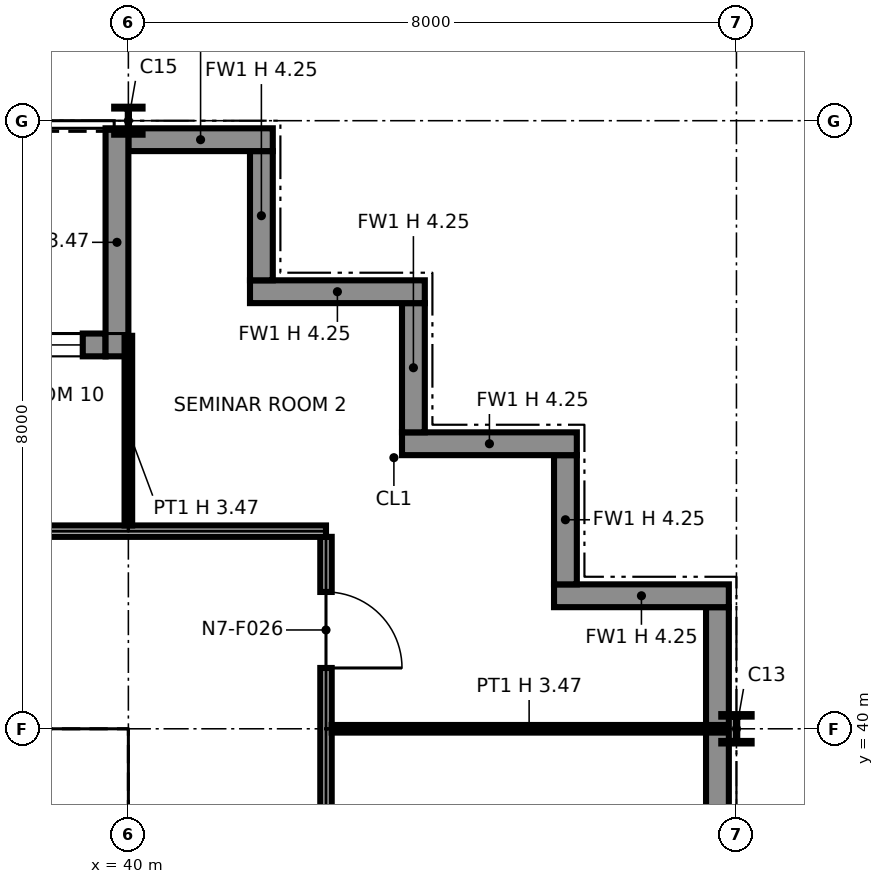
"""IFC4 building model, lengths in metres.
Left out: names, types, materials, properties, quantities, classifications, styles, units other than length and angle.
Written with IfcOpenShell. Run it as: python <this file> out.ifc"""

import sys

from ifc_helpers import new_model, si_unit, direction, frame, frame_2d, origin, origin_2d, place, context, subcontext, project, spatial, polyline, rectangle, i_section, outline, extrude, element, fill, save


model = new_model("IFC4")
c1 = context("Model", 3, precision=1e-05, world=origin(), true_north=direction((0.0, 1.0)))
c2 = subcontext(c1, "Body", "Model", "MODEL_VIEW")
j1 = project(units=[si_unit("LENGTHUNIT", "METRE"), si_unit("PLANEANGLEUNIT", "RADIAN")], contexts=[c1])
p1 = place(None, origin())
s1 = spatial("IfcSite", under=j1, at=p1, CompositionType="ELEMENT")
p2 = place(p1, origin())
s2 = spatial("IfcBuilding", under=s1, at=p2, CompositionType="ELEMENT")
p3 = place(p2, frame((0.0, 0.0, 105.2)))
s3 = spatial("IfcBuildingStorey", under=s2, at=p3, CompositionType="ELEMENT", Elevation=105.2)
p4 = place(p3, frame((40.0, 40.0, 0.0), z_axis=(0.0, 0.0, 1.0), x_axis=(1.0, 0.0, 0.0)))
e1 = element("IfcColumn", 1, at=p4, inside=s3, PredefinedType="COLUMN", context=c2, shape_type="SweptSolid", body=[
    extrude(i_section(OverallWidth=0.257, OverallDepth=0.363, WebThickness=0.013, FlangeThickness=0.022, at=origin_2d()), origin(), (0.0, 0.0, 1.0), 4.25),
])
p5 = place(p3, frame((40.0, 48.0, 0.0), z_axis=(0.0, 0.0, 1.0), x_axis=(1.0, 0.0, 0.0)))
e2 = element("IfcColumn", 2, at=p5, inside=s3, PredefinedType="COLUMN", context=c2, shape_type="SweptSolid", body=[
    extrude(i_section(OverallWidth=0.373, OverallDepth=0.368, WebThickness=0.015, FlangeThickness=0.024, at=origin_2d()), origin(), (0.0, 0.0, 1.0), 4.25),
])
p6 = place(p3, frame((48.0, 40.0, 0.0), z_axis=(0.0, 0.0, 1.0), x_axis=(1.0, 0.0, 0.0)))
e3 = element("IfcColumn", 3, at=p6, inside=s3, PredefinedType="COLUMN", context=c2, shape_type="SweptSolid", body=[
    extrude(i_section(OverallWidth=0.399, OverallDepth=0.386, WebThickness=0.021, FlangeThickness=0.033, at=origin_2d()), origin(), (0.0, 0.0, 1.0), 4.25),
])
p7 = place(p3, frame((47.75, 32.0, 0.0), z_axis=(0.0, 0.0, 1.0), x_axis=(0.0, 1.0, 0.0)))
e4 = element("IfcWall", 4, at=p7, inside=s3, PredefinedType="SOLIDWALL", context=c2, shape_type="SweptSolid", body=[
    extrude(rectangle(XDim=9.6, YDim=0.3, at=frame_2d((4.8, 0.0))), origin(), (0.0, 0.0, 1.0), 4.25),
])
p8 = place(p3, frame((47.9, 41.75, 0.0), z_axis=(0.0, 0.0, 1.0), x_axis=(-1.0, 0.0, 0.0)))
e5 = element("IfcWall", 5, at=p8, inside=s3, PredefinedType="SOLIDWALL", context=c2, shape_type="SweptSolid", body=[
    extrude(rectangle(XDim=2.3, YDim=0.3, at=frame_2d((1.15, 0.0))), origin(), (0.0, 0.0, 1.0), 4.25),
])
p9 = place(p3, frame((45.75, 41.9, 0.0), z_axis=(0.0, 0.0, 1.0), x_axis=(0.0, 1.0, 0.0)))
e6 = element("IfcWall", 6, at=p9, inside=s3, PredefinedType="SOLIDWALL", context=c2, shape_type="SweptSolid", body=[
    extrude(rectangle(XDim=1.7, YDim=0.3, at=frame_2d((0.85, 0.0))), origin(), (0.0, 0.0, 1.0), 4.25),
])
p10 = place(p3, frame((45.9, 43.75, 0.0), z_axis=(0.0, 0.0, 1.0), x_axis=(-1.0, 0.0, 0.0)))
e7 = element("IfcWall", 7, at=p10, inside=s3, PredefinedType="SOLIDWALL", context=c2, shape_type="SweptSolid", body=[
    extrude(rectangle(XDim=2.3, YDim=0.3, at=frame_2d((1.15, 0.0))), origin(), (0.0, 0.0, 1.0), 4.25),
])
p11 = place(p3, frame((43.75, 43.9, 0.0), z_axis=(0.0, 0.0, 1.0), x_axis=(0.0, 1.0, 0.0)))
e8 = element("IfcWall", 8, at=p11, inside=s3, PredefinedType="SOLIDWALL", context=c2, shape_type="SweptSolid", body=[
    extrude(rectangle(XDim=1.7, YDim=0.3, at=frame_2d((0.85, 0.0))), origin(), (0.0, 0.0, 1.0), 4.25),
])
p12 = place(p3, frame((43.9, 45.75, 0.0), z_axis=(0.0, 0.0, 1.0), x_axis=(-1.0, 0.0, 0.0)))
e9 = element("IfcWall", 9, at=p12, inside=s3, PredefinedType="SOLIDWALL", context=c2, shape_type="SweptSolid", body=[
    extrude(rectangle(XDim=2.3, YDim=0.3, at=frame_2d((1.15, 0.0))), origin(), (0.0, 0.0, 1.0), 4.25),
])
p13 = place(p3, frame((41.75, 45.9, 0.0), z_axis=(0.0, 0.0, 1.0), x_axis=(0.0, 1.0, 0.0)))
e10 = element("IfcWall", 10, at=p13, inside=s3, PredefinedType="SOLIDWALL", context=c2, shape_type="SweptSolid", body=[
    extrude(rectangle(XDim=1.7, YDim=0.3, at=frame_2d((0.85, 0.0))), origin(), (0.0, 0.0, 1.0), 4.25),
])
p14 = place(p3, frame((41.9, 47.75, 0.0), z_axis=(0.0, 0.0, 1.0), x_axis=(-1.0, 0.0, 0.0)))
e11 = element("IfcWall", 11, at=p14, inside=s3, PredefinedType="SOLIDWALL", context=c2, shape_type="SweptSolid", body=[
    extrude(rectangle(XDim=1.9, YDim=0.3, at=frame_2d((0.95, 0.0))), origin(), (0.0, 0.0, 1.0), 4.25),
])
p15 = place(p3, frame((39.7, 45.05, 0.0), z_axis=(0.0, 0.0, 1.0), x_axis=(-1.0, 0.0, 0.0)))
e12 = element("IfcWall", 12, at=p15, inside=s3, PredefinedType="SOLIDWALL", context=c2, shape_type="SweptSolid", body=[
    extrude(rectangle(XDim=7.4, YDim=0.3, at=frame_2d((3.7, 0.0))), origin(), (0.0, 0.0, 1.0), 4.25),
])
p16 = place(p15, frame((0.3, 0.0, 0.9)))
e13 = element("IfcOpeningElement", 13, at=p16, cuts=e12, PredefinedType="OPENING", context=c2, shape_type="SweptSolid", body=[
    extrude(rectangle(XDim=2.8, YDim=2.2, at=frame_2d((1.4, 1.1))), frame((0.0, 0.16, 0.0), z_axis=(0.0, -1.0, 0.0), x_axis=(1.0, 0.0, 0.0)), (0.0, 0.0, 1.0), 0.32),
])
p17 = place(p15, frame((4.7, 0.0, 0.0)))
e14 = element("IfcOpeningElement", 14, at=p17, cuts=e12, PredefinedType="OPENING", context=c2, shape_type="SweptSolid", body=[
    extrude(rectangle(XDim=2.0, YDim=2.4, at=frame_2d((1.0, 1.2))), frame((0.0, 0.16, 0.0), z_axis=(0.0, -1.0, 0.0), x_axis=(1.0, 0.0, 0.0)), (0.0, 0.0, 1.0), 0.32),
])
p18 = place(p3, frame((39.85, 47.9, 0.0), z_axis=(0.0, 0.0, 1.0), x_axis=(0.0, -1.0, 0.0)))
e15 = element("IfcWall", 15, at=p18, inside=s3, PredefinedType="SOLIDWALL", context=c2, shape_type="SweptSolid", body=[
    extrude(rectangle(XDim=3.0, YDim=0.3, at=frame_2d((1.5, 0.0))), origin(), (0.0, 0.0, 1.0), 3.469),
])
p19 = place(p3, frame((24.65, 39.25, 0.0), z_axis=(0.0, 0.0, 1.0), x_axis=(1.0, 0.0, 0.0)))
e16 = element("IfcWall", 16, at=p19, inside=s3, PredefinedType="PARTITIONING", context=c2, shape_type="SweptSolid", body=[
    extrude(outline(polyline([(0.0, 0.0), (14.7, 0.0), (14.7, 4.25), (7.469, 4.25), (7.469, 3.632), (7.231, 3.632), (7.23, 4.25), (0.0, 4.25), (0.0, 0.0)])), frame((0.0, 0.1, 0.0), z_axis=(0.0, -1.0, 0.0), x_axis=(1.0, 0.0, 0.0)), (0.0, 0.0, 1.0), 0.2),
])
p20 = place(p3, frame((39.25, 32.85, 0.0), z_axis=(0.0, 0.0, 1.0), x_axis=(0.0, 1.0, 0.0)))
e17 = element("IfcWall", 17, at=p20, inside=s3, PredefinedType="PARTITIONING", context=c2, shape_type="SweptSolid", body=[
    extrude(rectangle(XDim=6.3, YDim=0.2, at=frame_2d((3.15, 0.0))), origin(), (0.0, 0.0, 1.0), 4.25),
])
p21 = place(p3, frame((42.6, 16.0, 0.0), z_axis=(0.0, 0.0, 1.0), x_axis=(0.0, 1.0, 0.0)))
e18 = element("IfcWall", 18, at=p21, inside=s3, PredefinedType="PARTITIONING", context=c2, shape_type="SweptSolid", body=[
    extrude(outline(polyline([(0.0, 0.0), (26.525, 0.0), (26.525, 4.25), (24.3, 4.25), (24.298, 3.47), (23.702, 3.47), (23.7, 4.25), (20.3, 4.25), (20.298, 3.47), (19.702, 3.47), (19.7, 4.25), (16.3, 4.25), (16.298, 3.47), (15.702, 3.47), (15.7, 4.25), (12.3, 4.25), (12.298, 3.47), (11.702, 3.47), (11.7, 4.25), (8.3, 4.25), (8.298, 3.47), (7.702, 3.47), (7.7, 4.25), (4.3, 4.25), (4.298, 3.47), (3.702, 3.47), (3.7, 4.25), (0.0, 4.25), (0.0, 0.0)])), frame((0.0, 0.075, 0.0), z_axis=(0.0, -1.0, 0.0), x_axis=(1.0, 0.0, 0.0)), (0.0, 0.0, 1.0), 0.15),
])
p22 = place(p21, frame((2.5, 0.0, 0.0), z_axis=(0.0, 0.0, 1.0), x_axis=(-1.0, 0.0, 0.0)))
e19 = element("IfcOpeningElement", 19, at=p22, cuts=e18, PredefinedType="OPENING", context=c2, shape_type="SweptSolid", body=[
    extrude(rectangle(XDim=1.0, YDim=2.1, at=frame_2d((0.5, 1.05))), frame((0.0, 0.085, 0.0), z_axis=(0.0, -1.0, 0.0), x_axis=(1.0, 0.0, 0.0)), (0.0, 0.0, 1.0), 0.17),
])
p23 = place(p21, frame((6.5, 0.0, 0.0), z_axis=(0.0, 0.0, 1.0), x_axis=(-1.0, 0.0, 0.0)))
e20 = element("IfcOpeningElement", 20, at=p23, cuts=e18, PredefinedType="OPENING", context=c2, shape_type="SweptSolid", body=[
    extrude(rectangle(XDim=1.0, YDim=2.1, at=frame_2d((0.5, 1.05))), frame((0.0, 0.085, 0.0), z_axis=(0.0, -1.0, 0.0), x_axis=(1.0, 0.0, 0.0)), (0.0, 0.0, 1.0), 0.17),
])
p24 = place(p21, frame((12.5, 0.0, 0.0), z_axis=(0.0, 0.0, 1.0), x_axis=(-1.0, 0.0, 0.0)))
e21 = element("IfcOpeningElement", 21, at=p24, cuts=e18, PredefinedType="OPENING", context=c2, shape_type="SweptSolid", body=[
    extrude(rectangle(XDim=1.0, YDim=2.1, at=frame_2d((0.5, 1.05))), frame((0.0, 0.085, 0.0), z_axis=(0.0, -1.0, 0.0), x_axis=(1.0, 0.0, 0.0)), (0.0, 0.0, 1.0), 0.17),
])
p25 = place(p21, frame((18.5, 0.0, 0.0), z_axis=(0.0, 0.0, 1.0), x_axis=(-1.0, 0.0, 0.0)))
e22 = element("IfcOpeningElement", 22, at=p25, cuts=e18, PredefinedType="OPENING", context=c2, shape_type="SweptSolid", body=[
    extrude(rectangle(XDim=1.0, YDim=2.1, at=frame_2d((0.5, 1.05))), frame((0.0, 0.085, 0.0), z_axis=(0.0, -1.0, 0.0), x_axis=(1.0, 0.0, 0.0)), (0.0, 0.0, 1.0), 0.17),
])
p26 = place(p21, frame((22.5, 0.0, 0.0), z_axis=(0.0, 0.0, 1.0), x_axis=(-1.0, 0.0, 0.0)))
e23 = element("IfcOpeningElement", 23, at=p26, cuts=e18, PredefinedType="OPENING", context=c2, shape_type="SweptSolid", body=[
    extrude(rectangle(XDim=1.0, YDim=2.1, at=frame_2d((0.5, 1.05))), frame((0.0, 0.085, 0.0), z_axis=(0.0, -1.0, 0.0), x_axis=(1.0, 0.0, 0.0)), (0.0, 0.0, 1.0), 0.17),
])
p27 = place(p21, frame((25.8, 0.0, 0.0), z_axis=(0.0, 0.0, 1.0), x_axis=(-1.0, 0.0, 0.0)))
e24 = element("IfcOpeningElement", 24, at=p27, cuts=e18, PredefinedType="OPENING", context=c2, shape_type="SweptSolid", body=[
    extrude(rectangle(XDim=1.0, YDim=2.1, at=frame_2d((0.5, 1.05))), frame((0.0, 0.085, 0.0), z_axis=(0.0, -1.0, 0.0), x_axis=(1.0, 0.0, 0.0)), (0.0, 0.0, 1.0), 0.17),
])
p28 = place(p3, frame((42.675, 40.0, 0.0), z_axis=(0.0, 0.0, 1.0), x_axis=(1.0, 0.0, 0.0)))
e25 = element("IfcWall", 25, at=p28, inside=s3, PredefinedType="PARTITIONING", context=c2, shape_type="SweptSolid", body=[
    extrude(rectangle(XDim=5.195, YDim=0.1, at=frame_2d((2.598, 0.0))), origin(), (0.0, 0.0, 1.0), 3.47),
])
p29 = place(p3, frame((8.05, 42.6, 0.0), z_axis=(0.0, 0.0, 1.0), x_axis=(1.0, 0.0, 0.0)))
e26 = element("IfcWall", 26, at=p29, inside=s3, PredefinedType="PARTITIONING", context=c2, shape_type="SweptSolid", body=[
    extrude(rectangle(XDim=34.55, YDim=0.15, at=frame_2d((17.275, 0.0))), origin(), (0.0, 0.0, 1.0), 4.25),
])
p30 = place(p29, frame((9.45, 0.0, 0.0)))
e27 = element("IfcOpeningElement", 27, at=p30, cuts=e26, PredefinedType="OPENING", context=c2, shape_type="SweptSolid", body=[
    extrude(rectangle(XDim=1.0, YDim=2.1, at=frame_2d((0.5, 1.05))), frame((0.0, 0.085, 0.0), z_axis=(0.0, -1.0, 0.0), x_axis=(1.0, 0.0, 0.0)), (0.0, 0.0, 1.0), 0.17),
])
p31 = place(p29, frame((13.45, 0.0, 0.0)))
e28 = element("IfcOpeningElement", 28, at=p31, cuts=e26, PredefinedType="OPENING", context=c2, shape_type="SweptSolid", body=[
    extrude(rectangle(XDim=1.0, YDim=2.1, at=frame_2d((0.5, 1.05))), frame((0.0, 0.085, 0.0), z_axis=(0.0, -1.0, 0.0), x_axis=(1.0, 0.0, 0.0)), (0.0, 0.0, 1.0), 0.17),
])
p32 = place(p29, frame((25.45, 0.0, 0.0)))
e29 = element("IfcOpeningElement", 29, at=p32, cuts=e26, PredefinedType="OPENING", context=c2, shape_type="SweptSolid", body=[
    extrude(rectangle(XDim=1.0, YDim=2.1, at=frame_2d((0.5, 1.05))), frame((0.0, 0.085, 0.0), z_axis=(0.0, -1.0, 0.0), x_axis=(1.0, 0.0, 0.0)), (0.0, 0.0, 1.0), 0.17),
])
p33 = place(p29, frame((29.45, 0.0, 0.0)))
e30 = element("IfcOpeningElement", 30, at=p33, cuts=e26, PredefinedType="OPENING", context=c2, shape_type="SweptSolid", body=[
    extrude(rectangle(XDim=1.0, YDim=2.1, at=frame_2d((0.5, 1.05))), frame((0.0, 0.085, 0.0), z_axis=(0.0, -1.0, 0.0), x_axis=(1.0, 0.0, 0.0)), (0.0, 0.0, 1.0), 0.17),
])
p34 = place(p29, frame((1.45, 0.0, 0.0)))
e31 = element("IfcOpeningElement", 31, at=p34, cuts=e26, PredefinedType="OPENING", context=c2, shape_type="SweptSolid", body=[
    extrude(rectangle(XDim=1.0, YDim=2.1, at=frame_2d((0.5, 1.05))), frame((0.0, 0.085, 0.0), z_axis=(0.0, -1.0, 0.0), x_axis=(1.0, 0.0, 0.0)), (0.0, 0.0, 1.0), 0.17),
])
p35 = place(p29, frame((5.45, 0.0, 0.0)))
e32 = element("IfcOpeningElement", 32, at=p35, cuts=e26, PredefinedType="OPENING", context=c2, shape_type="SweptSolid", body=[
    extrude(rectangle(XDim=1.0, YDim=2.1, at=frame_2d((0.5, 1.05))), frame((0.0, 0.085, 0.0), z_axis=(0.0, -1.0, 0.0), x_axis=(1.0, 0.0, 0.0)), (0.0, 0.0, 1.0), 0.17),
])
p36 = place(p29, frame((17.45, 0.0, 0.0)))
e33 = element("IfcOpeningElement", 33, at=p36, cuts=e26, PredefinedType="OPENING", context=c2, shape_type="SweptSolid", body=[
    extrude(rectangle(XDim=1.0, YDim=2.1, at=frame_2d((0.5, 1.05))), frame((0.0, 0.085, 0.0), z_axis=(0.0, -1.0, 0.0), x_axis=(1.0, 0.0, 0.0)), (0.0, 0.0, 1.0), 0.17),
])
p37 = place(p29, frame((21.45, 0.0, 0.0)))
e34 = element("IfcOpeningElement", 34, at=p37, cuts=e26, PredefinedType="OPENING", context=c2, shape_type="SweptSolid", body=[
    extrude(rectangle(XDim=1.0, YDim=2.1, at=frame_2d((0.5, 1.05))), frame((0.0, 0.085, 0.0), z_axis=(0.0, -1.0, 0.0), x_axis=(1.0, 0.0, 0.0)), (0.0, 0.0, 1.0), 0.17),
])
p38 = place(p3, frame((40.0, 42.675, 0.0), z_axis=(0.0, 0.0, 1.0), x_axis=(0.0, 1.0, 0.0)))
e35 = element("IfcWall", 35, at=p38, inside=s3, PredefinedType="PARTITIONING", context=c2, shape_type="SweptSolid", body=[
    extrude(rectangle(XDim=2.495, YDim=0.1, at=frame_2d((1.248, 0.0))), origin(), (0.0, 0.0, 1.0), 3.47),
])
p39 = place(p16, origin())
e36 = element("IfcWindow", 36, at=p39, inside=s3, PartitioningType="SINGLE_PANEL", PredefinedType="WINDOW", context=c2, shape_type="SweptSolid", body=[
    extrude(rectangle(XDim=2.8, YDim=2.2, at=frame_2d((1.4, 1.1))), frame((0.0, 0.03, 0.0), z_axis=(0.0, -1.0, 0.0), x_axis=(1.0, 0.0, 0.0)), (0.0, 0.0, 1.0), 0.06),
])
fill(e13, e36)
p40 = place(p27, origin())
e37 = element("IfcDoor", 37, at=p40, inside=s3, OperationType="SINGLE_SWING_RIGHT", PredefinedType="DOOR", context=c2, shape_type="SweptSolid", body=[
    extrude(rectangle(XDim=1.0, YDim=2.1, at=frame_2d((0.5, 1.05))), frame((0.0, 0.025, 0.0), z_axis=(0.0, -1.0, 0.0), x_axis=(1.0, 0.0, 0.0)), (0.0, 0.0, 1.0), 0.05),
])
fill(e24, e37)
save(model, sys.argv[1])
